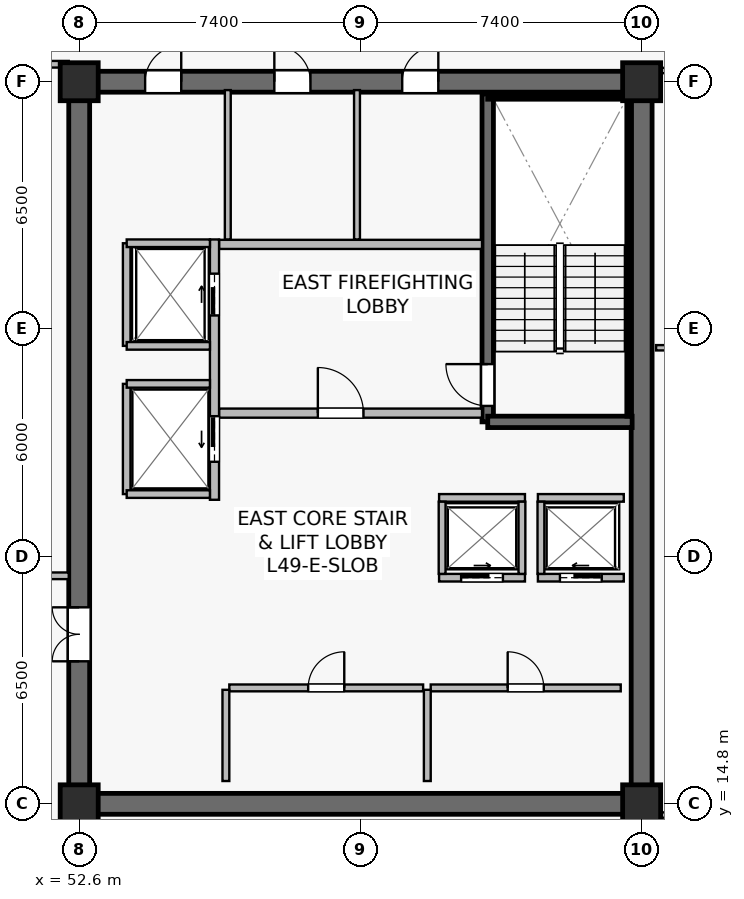
"""IFC4 building model, lengths in metres.
Left out: names, types, materials, properties, quantities, classifications, styles, units other than length and angle.
Written with IfcOpenShell. Run it as: python <this file> out.ifc"""

import sys

from ifc_helpers import new_model, si_unit, direction, frame, frame_2d, origin, origin_2d, place, context, subcontext, project, spatial, rectangle, extrude, source, transform, mapped, element, fill, save


model = new_model("IFC4")
c1 = context("Model", 3, precision=1e-05, world=origin(), true_north=direction((0.0, 1.0)))
c2 = subcontext(c1, "Body", "Model", "MODEL_VIEW")
j1 = project(units=[si_unit("LENGTHUNIT", "METRE"), si_unit("PLANEANGLEUNIT", "RADIAN")], contexts=[c1])
p1 = place(None, origin())
s1 = spatial("IfcSite", under=j1, at=p1, CompositionType="ELEMENT")
p2 = place(p1, origin())
s2 = spatial("IfcBuilding", under=s1, at=p2, CompositionType="ELEMENT")
p3 = place(p2, frame((0.0, 0.0, 205.5)))
s3 = spatial("IfcBuildingStorey", under=s2, at=p3, CompositionType="ELEMENT", Elevation=205.5)
p4 = place(p3, frame((52.325, 14.8, 0.0), z_axis=(0.0, 0.0, 1.0), x_axis=(1.0, 0.0, 0.0)))
e1 = element("IfcWall", 1, at=p4, inside=s3, PredefinedType="SHEAR", context=c2, shape_type="SweptSolid", body=[
    extrude(rectangle(XDim=15.35, YDim=0.55, at=frame_2d((7.675, 0.0))), origin(), (0.0, 0.0, 1.0), 3.8),
])
p5 = place(p3, frame((52.325, 33.8, 0.0), z_axis=(0.0, 0.0, 1.0), x_axis=(1.0, 0.0, 0.0)))
e2 = element("IfcWall", 2, at=p5, inside=s3, PredefinedType="SHEAR", context=c2, shape_type="SweptSolid", body=[
    extrude(rectangle(XDim=15.35, YDim=0.55, at=frame_2d((7.675, 0.0))), origin(), (0.0, 0.0, 1.0), 3.8),
])
p6 = place(p5, frame((8.775, 0.0, 0.0)))
e3 = element("IfcOpeningElement", 3, at=p6, cuts=e2, PredefinedType="OPENING", context=c2, shape_type="SweptSolid", body=[
    extrude(rectangle(XDim=0.95, YDim=2.15, at=frame_2d((0.475, 1.075))), frame((0.0, 0.285, 0.0), z_axis=(0.0, -1.0, 0.0), x_axis=(1.0, 0.0, 0.0)), (0.0, 0.0, 1.0), 0.57),
])
p7 = place(p5, frame((5.41, 0.0, 0.0)))
e4 = element("IfcOpeningElement", 4, at=p7, cuts=e2, PredefinedType="OPENING", context=c2, shape_type="SweptSolid", body=[
    extrude(rectangle(XDim=0.95, YDim=2.15, at=frame_2d((0.475, 1.075))), frame((0.0, 0.285, 0.0), z_axis=(0.0, -1.0, 0.0), x_axis=(1.0, 0.0, 0.0)), (0.0, 0.0, 1.0), 0.57),
])
p8 = place(p5, frame((2.01, 0.0, 0.0)))
e5 = element("IfcOpeningElement", 5, at=p8, cuts=e2, PredefinedType="OPENING", context=c2, shape_type="SweptSolid", body=[
    extrude(rectangle(XDim=0.95, YDim=2.15, at=frame_2d((0.475, 1.075))), frame((0.0, 0.285, 0.0), z_axis=(0.0, -1.0, 0.0), x_axis=(1.0, 0.0, 0.0)), (0.0, 0.0, 1.0), 0.57),
])
p9 = place(p3, frame((52.6, 15.075, 0.0), z_axis=(0.0, 0.0, 1.0), x_axis=(0.0, 1.0, 0.0)))
e6 = element("IfcWall", 6, at=p9, inside=s3, PredefinedType="SHEAR", context=c2, shape_type="SweptSolid", body=[
    extrude(rectangle(XDim=18.45, YDim=0.55, at=frame_2d((9.225, 0.0))), origin(), (0.0, 0.0, 1.0), 3.8),
])
p10 = place(p9, frame((3.475, 0.0, 0.0)))
e7 = element("IfcOpeningElement", 7, at=p10, cuts=e6, PredefinedType="OPENING", context=c2, shape_type="SweptSolid", body=[
    extrude(rectangle(XDim=1.42, YDim=2.2, at=frame_2d((0.71, 1.1))), frame((0.0, 0.285, 0.0), z_axis=(0.0, -1.0, 0.0), x_axis=(1.0, 0.0, 0.0)), (0.0, 0.0, 1.0), 0.57),
])
p11 = place(p3, frame((67.4, 15.075, 0.0), z_axis=(0.0, 0.0, 1.0), x_axis=(0.0, 1.0, 0.0)))
e8 = element("IfcWall", 8, at=p11, inside=s3, PredefinedType="SHEAR", context=c2, shape_type="SweptSolid", body=[
    extrude(rectangle(XDim=18.45, YDim=0.55, at=frame_2d((9.225, 0.0))), origin(), (0.0, 0.0, 1.0), 3.8),
])
p12 = place(p3, frame((63.35, 24.85, 0.0), z_axis=(0.0, 0.0, 1.0), x_axis=(0.0, 1.0, 0.0)))
e9 = element("IfcWall", 9, at=p12, inside=s3, PredefinedType="SHEAR", context=c2, shape_type="SweptSolid", body=[
    extrude(rectangle(XDim=8.63, YDim=0.3, at=frame_2d((4.315, 0.0))), origin(), (0.0, 0.0, 1.0), 3.8),
])
p13 = place(p12, frame((0.42, 0.0, 0.0)))
e10 = element("IfcOpeningElement", 10, at=p13, cuts=e9, PredefinedType="OPENING", context=c2, shape_type="SweptSolid", body=[
    extrude(rectangle(XDim=1.1, YDim=2.15, at=frame_2d((0.55, 1.075))), frame((0.0, 0.16, 0.0), z_axis=(0.0, -1.0, 0.0), x_axis=(1.0, 0.0, 0.0)), (0.0, 0.0, 1.0), 0.32),
])
p14 = place(p3, frame((63.35, 24.85, 0.0), z_axis=(0.0, 0.0, 1.0), x_axis=(1.0, 0.0, 0.0)))
e11 = element("IfcWall", 11, at=p14, inside=s3, PredefinedType="SHEAR", context=c2, shape_type="SweptSolid", body=[
    extrude(rectangle(XDim=3.8, YDim=0.3, at=frame_2d((1.9, 0.0))), origin(), (0.0, 0.0, 1.0), 3.8),
])
p15 = place(p3, frame((63.35, 33.4, 0.0), z_axis=(0.0, 0.0, 1.0), x_axis=(1.0, 0.0, 0.0)))
e12 = element("IfcWall", 12, at=p15, inside=s3, PredefinedType="SOLIDWALL", context=c2, shape_type="SweptSolid", body=[
    extrude(rectangle(XDim=3.72, YDim=0.12, at=frame_2d((1.86, 0.0))), origin(), (0.0, 0.0, 1.0), 3.8),
])
p16 = place(p3, frame((67.07, 25.0, 0.0), z_axis=(0.0, 0.0, 1.0), x_axis=(0.0, 1.0, 0.0)))
e13 = element("IfcWall", 13, at=p16, inside=s3, PredefinedType="SOLIDWALL", context=c2, shape_type="SweptSolid", body=[
    extrude(rectangle(XDim=8.32, YDim=0.12, at=frame_2d((4.16, 0.0))), origin(), (0.0, 0.0, 1.0), 3.8),
])
m1 = source(origin(), c2, "Body", "SweptSolid", [
    extrude(rectangle(XDim=1.0, YDim=1.0, at=origin_2d()), origin(), (0.0, 0.0, 1.0), 4.1),
])
for number, where, z_axis, x_axis in (
    (14, (52.6, 14.8, 0.0), (0.0, 0.0, 1.0), (1.0, 0.0, 0.0)),
    (15, (67.4, 14.8, 0.0), (0.0, 0.0, 1.0), (1.0, 0.0, 0.0)),
    (16, (52.6, 33.8, 0.0), (0.0, 0.0, 1.0), (1.0, 0.0, 0.0)),
    (17, (67.4, 33.8, 0.0), (0.0, 0.0, 1.0), (1.0, 0.0, 0.0)),
):
    element("IfcColumn", number, at=place(p3, frame(where, z_axis=z_axis, x_axis=x_axis)), inside=s3, PredefinedType="COLUMN", context=c2, shape_type="MappedRepresentation", body=[
        mapped(m1, transform((0.0, 0.0, 0.0), scale=1.0)),
    ])
p17 = place(p3, frame((56.28, 25.08, 0.0), z_axis=(0.0, 0.0, 1.0), x_axis=(1.0, 0.0, 0.0)))
e18 = element("IfcWall", 18, at=p17, inside=s3, PredefinedType="SOLIDWALL", context=c2, shape_type="SweptSolid", body=[
    extrude(rectangle(XDim=6.92, YDim=0.24, at=frame_2d((3.46, 0.0))), origin(), (0.0, 0.0, 1.0), 3.197),
])
p18 = place(p17, frame((2.6, 0.0, 0.0)))
e19 = element("IfcOpeningElement", 19, at=p18, cuts=e18, PredefinedType="OPENING", context=c2, shape_type="SweptSolid", body=[
    extrude(rectangle(XDim=1.2, YDim=2.16, at=frame_2d((0.6, 1.08))), frame((0.0, 0.13, 0.0), z_axis=(0.0, -1.0, 0.0), x_axis=(1.0, 0.0, 0.0)), (0.0, 0.0, 1.0), 0.26),
])
p19 = place(p3, frame((56.28, 29.52, 0.0), z_axis=(0.0, 0.0, 1.0), x_axis=(1.0, 0.0, 0.0)))
e20 = element("IfcWall", 20, at=p19, inside=s3, PredefinedType="SOLIDWALL", context=c2, shape_type="SweptSolid", body=[
    extrude(rectangle(XDim=6.92, YDim=0.24, at=frame_2d((3.46, 0.0))), origin(), (0.0, 0.0, 1.0), 3.197),
])
p20 = place(p3, frame((56.16, 22.8, 0.0), z_axis=(0.0, 0.0, 1.0), x_axis=(0.0, 1.0, 0.0)))
e21 = element("IfcWall", 21, at=p20, inside=s3, PredefinedType="SOLIDWALL", context=c2, shape_type="SweptSolid", body=[
    extrude(rectangle(XDim=6.85, YDim=0.24, at=frame_2d((3.425, 0.0))), origin(), (0.0, 0.0, 1.0), 2.935),
])
p21 = place(p20, frame((4.85, 0.0, 0.0)))
e22 = element("IfcOpeningElement", 22, at=p21, cuts=e21, PredefinedType="OPENING", context=c2, shape_type="SweptSolid", body=[
    extrude(rectangle(XDim=1.1, YDim=2.22, at=frame_2d((0.55, 1.11))), frame((0.0, 0.13, 0.0), z_axis=(0.0, -1.0, 0.0), x_axis=(1.0, 0.0, 0.0)), (0.0, 0.0, 1.0), 0.26),
])
p22 = place(p20, frame((1.0, 0.0, 0.0)))
e23 = element("IfcOpeningElement", 23, at=p22, cuts=e21, PredefinedType="OPENING", context=c2, shape_type="SweptSolid", body=[
    extrude(rectangle(XDim=1.2, YDim=2.22, at=frame_2d((0.6, 1.11))), frame((0.0, 0.13, 0.0), z_axis=(0.0, -1.0, 0.0), x_axis=(1.0, 0.0, 0.0)), (0.0, 0.0, 1.0), 0.26),
])
p23 = place(p3, frame((64.67, 20.75, 0.0), z_axis=(0.0, 0.0, 1.0), x_axis=(1.0, 0.0, 0.0)))
e24 = element("IfcWall", 24, at=p23, inside=s3, PredefinedType="SOLIDWALL", context=c2, shape_type="SweptSolid", body=[
    extrude(rectangle(XDim=2.26, YDim=0.2, at=frame_2d((1.13, 0.0))), origin(), (0.0, 0.0, 1.0), 3.8),
])
p24 = place(p23, frame((0.58, 0.0, 0.0)))
e25 = element("IfcOpeningElement", 25, at=p24, cuts=e24, PredefinedType="OPENING", context=c2, shape_type="SweptSolid", body=[
    extrude(rectangle(XDim=1.1, YDim=2.22, at=frame_2d((0.55, 1.11))), frame((0.0, 0.11, 0.0), z_axis=(0.0, -1.0, 0.0), x_axis=(1.0, 0.0, 0.0)), (0.0, 0.0, 1.0), 0.22),
])
p25 = place(p3, frame((64.67, 22.85, 0.0), z_axis=(0.0, 0.0, 1.0), x_axis=(1.0, 0.0, 0.0)))
e26 = element("IfcWall", 26, at=p25, inside=s3, PredefinedType="SOLIDWALL", context=c2, shape_type="SweptSolid", body=[
    extrude(rectangle(XDim=2.26, YDim=0.2, at=frame_2d((1.13, 0.0))), origin(), (0.0, 0.0, 1.0), 3.8),
])
p26 = place(p3, frame((64.75, 20.85, 0.0), z_axis=(0.0, 0.0, 1.0), x_axis=(0.0, 1.0, 0.0)))
e27 = element("IfcWall", 27, at=p26, inside=s3, PredefinedType="SOLIDWALL", context=c2, shape_type="SweptSolid", body=[
    extrude(rectangle(XDim=1.9, YDim=0.18, at=frame_2d((0.95, 0.0))), origin(), (0.0, 0.0, 1.0), 3.8),
])
p27 = place(p3, frame((62.07, 20.75, 0.0), z_axis=(0.0, 0.0, 1.0), x_axis=(1.0, 0.0, 0.0)))
e28 = element("IfcWall", 28, at=p27, inside=s3, PredefinedType="SOLIDWALL", context=c2, shape_type="SweptSolid", body=[
    extrude(rectangle(XDim=2.26, YDim=0.2, at=frame_2d((1.13, 0.0))), origin(), (0.0, 0.0, 1.0), 3.8),
])
p28 = place(p27, frame((0.58, 0.0, 0.0)))
e29 = element("IfcOpeningElement", 29, at=p28, cuts=e28, PredefinedType="OPENING", context=c2, shape_type="SweptSolid", body=[
    extrude(rectangle(XDim=1.1, YDim=2.22, at=frame_2d((0.55, 1.11))), frame((0.0, 0.11, 0.0), z_axis=(0.0, -1.0, 0.0), x_axis=(1.0, 0.0, 0.0)), (0.0, 0.0, 1.0), 0.22),
])
p29 = place(p3, frame((62.07, 22.85, 0.0), z_axis=(0.0, 0.0, 1.0), x_axis=(1.0, 0.0, 0.0)))
e30 = element("IfcWall", 30, at=p29, inside=s3, PredefinedType="SOLIDWALL", context=c2, shape_type="SweptSolid", body=[
    extrude(rectangle(XDim=2.26, YDim=0.2, at=frame_2d((1.13, 0.0))), origin(), (0.0, 0.0, 1.0), 3.8),
])
for number, where, z_axis, x_axis in (
    (31, (62.15, 20.85, 0.0), (0.0, 0.0, 1.0), (0.0, 1.0, 0.0)),
    (32, (64.25, 20.85, 0.0), (0.0, 0.0, 1.0), (0.0, 1.0, 0.0)),
):
    element("IfcWall", number, at=place(p3, frame(where, z_axis=z_axis, x_axis=x_axis)), inside=s3, PredefinedType="SOLIDWALL", context=c2, shape_type="SweptSolid", body=[
        extrude(rectangle(XDim=1.9, YDim=0.18, at=frame_2d((0.95, 0.0))), origin(), (0.0, 0.0, 1.0), 3.8),
    ])
p30 = place(p3, frame((53.85, 26.85, 0.0), z_axis=(0.0, 0.0, 1.0), x_axis=(0.0, 1.0, 0.0)))
e33 = element("IfcWall", 33, at=p30, inside=s3, PredefinedType="SOLIDWALL", context=c2, shape_type="SweptSolid", body=[
    extrude(rectangle(XDim=2.7, YDim=0.2, at=frame_2d((1.35, 0.0))), origin(), (0.0, 0.0, 1.0), 3.8),
])
p31 = place(p3, frame((53.85, 29.55, 0.0), z_axis=(0.0, 0.0, 1.0), x_axis=(1.0, 0.0, 0.0)))
e34 = element("IfcWall", 34, at=p31, inside=s3, PredefinedType="SOLIDWALL", context=c2, shape_type="SweptSolid", body=[
    extrude(rectangle(XDim=2.19, YDim=0.2, at=frame_2d((1.095, 0.0))), origin(), (0.0, 0.0, 1.0), 3.8),
])
p32 = place(p3, frame((53.85, 26.85, 0.0), z_axis=(0.0, 0.0, 1.0), x_axis=(1.0, 0.0, 0.0)))
e35 = element("IfcWall", 35, at=p32, inside=s3, PredefinedType="SOLIDWALL", context=c2, shape_type="SweptSolid", body=[
    extrude(rectangle(XDim=2.19, YDim=0.2, at=frame_2d((1.095, 0.0))), origin(), (0.0, 0.0, 1.0), 3.197),
])
p33 = place(p3, frame((53.85, 22.95, 0.0), z_axis=(0.0, 0.0, 1.0), x_axis=(0.0, 1.0, 0.0)))
e36 = element("IfcWall", 36, at=p33, inside=s3, PredefinedType="SOLIDWALL", context=c2, shape_type="SweptSolid", body=[
    extrude(rectangle(XDim=2.9, YDim=0.2, at=frame_2d((1.45, 0.0))), origin(), (0.0, 0.0, 1.0), 2.935),
])
for number, where, z_axis, x_axis in (
    (37, (53.85, 25.85, 0.0), (0.0, 0.0, 1.0), (1.0, 0.0, 0.0)),
    (38, (53.85, 22.95, 0.0), (0.0, 0.0, 1.0), (1.0, 0.0, 0.0)),
):
    element("IfcWall", number, at=place(p3, frame(where, z_axis=z_axis, x_axis=x_axis)), inside=s3, PredefinedType="SOLIDWALL", context=c2, shape_type="SweptSolid", body=[
        extrude(rectangle(XDim=2.19, YDim=0.2, at=frame_2d((1.095, 0.0))), origin(), (0.0, 0.0, 1.0), 3.8),
    ])
p34 = place(p3, frame((61.85, 17.85, 0.0), z_axis=(0.0, 0.0, 1.0), x_axis=(1.0, 0.0, 0.0)))
e39 = element("IfcWall", 39, at=p34, inside=s3, PredefinedType="SOLIDWALL", context=c2, shape_type="SweptSolid", body=[
    extrude(rectangle(XDim=5.0, YDim=0.18, at=frame_2d((2.5, 0.0))), origin(), (0.0, 0.0, 1.0), 3.8),
])
p35 = place(p34, frame((2.025, 0.0, 0.0)))
e40 = element("IfcOpeningElement", 40, at=p35, cuts=e39, PredefinedType="OPENING", context=c2, shape_type="SweptSolid", body=[
    extrude(rectangle(XDim=0.95, YDim=2.15, at=frame_2d((0.475, 1.075))), frame((0.0, 0.1, 0.0), z_axis=(0.0, -1.0, 0.0), x_axis=(1.0, 0.0, 0.0)), (0.0, 0.0, 1.0), 0.2),
])
p36 = place(p3, frame((61.76, 15.4, 0.0), z_axis=(0.0, 0.0, 1.0), x_axis=(0.0, 1.0, 0.0)))
e41 = element("IfcWall", 41, at=p36, inside=s3, PredefinedType="SOLIDWALL", context=c2, shape_type="SweptSolid", body=[
    extrude(rectangle(XDim=2.4, YDim=0.18, at=frame_2d((1.2, 0.0))), origin(), (0.0, 0.0, 1.0), 3.8),
])
p37 = place(p3, frame((56.55, 17.85, 0.0), z_axis=(0.0, 0.0, 1.0), x_axis=(1.0, 0.0, 0.0)))
e42 = element("IfcWall", 42, at=p37, inside=s3, PredefinedType="SOLIDWALL", context=c2, shape_type="SweptSolid", body=[
    extrude(rectangle(XDim=5.1, YDim=0.18, at=frame_2d((2.55, 0.0))), origin(), (0.0, 0.0, 1.0), 3.197),
])
p38 = place(p37, frame((2.075, 0.0, 0.0)))
e43 = element("IfcOpeningElement", 43, at=p38, cuts=e42, PredefinedType="OPENING", context=c2, shape_type="SweptSolid", body=[
    extrude(rectangle(XDim=0.95, YDim=2.15, at=frame_2d((0.475, 1.075))), frame((0.0, 0.1, 0.0), z_axis=(0.0, -1.0, 0.0), x_axis=(1.0, 0.0, 0.0)), (0.0, 0.0, 1.0), 0.2),
])
p39 = place(p3, frame((56.46, 15.4, 0.0), z_axis=(0.0, 0.0, 1.0), x_axis=(0.0, 1.0, 0.0)))
e44 = element("IfcWall", 44, at=p39, inside=s3, PredefinedType="SOLIDWALL", context=c2, shape_type="SweptSolid", body=[
    extrude(rectangle(XDim=2.4, YDim=0.18, at=frame_2d((1.2, 0.0))), origin(), (0.0, 0.0, 1.0), 3.8),
])
p40 = place(p3, frame((59.91, 29.65, 0.0), z_axis=(0.0, 0.0, 1.0), x_axis=(0.0, 1.0, 0.0)))
e45 = element("IfcWall", 45, at=p40, inside=s3, PredefinedType="PLUMBINGWALL", context=c2, shape_type="SweptSolid", body=[
    extrude(rectangle(XDim=3.93, YDim=0.155, at=frame_2d((1.965, 0.0))), origin(), (0.0, 0.0, 1.0), 3.197),
])
p41 = place(p3, frame((56.51, 29.65, 0.0), z_axis=(0.0, 0.0, 1.0), x_axis=(0.0, 1.0, 0.0)))
e46 = element("IfcWall", 46, at=p41, inside=s3, PredefinedType="PLUMBINGWALL", context=c2, shape_type="SweptSolid", body=[
    extrude(rectangle(XDim=3.93, YDim=0.155, at=frame_2d((1.965, 0.0))), origin(), (0.0, 0.0, 1.0), 3.8),
])
p42 = place(p3, frame((48.3, 34.26, 0.0), z_axis=(0.0, 0.0, 1.0), x_axis=(1.0, 0.0, 0.0)))
e47 = element("IfcWall", 47, at=p42, inside=s3, PredefinedType="PARTITIONING", context=c2, shape_type="SweptSolid", body=[
    extrude(rectangle(XDim=4.025, YDim=0.175, at=frame_2d((2.012, 0.0))), origin(), (0.0, 0.0, 1.0), 3.485),
])
p43 = place(p3, frame((48.3, 20.8, 0.0), z_axis=(0.0, 0.0, 1.0), x_axis=(1.0, 0.0, 0.0)))
e48 = element("IfcWall", 48, at=p43, inside=s3, PredefinedType="PARTITIONING", context=c2, shape_type="SweptSolid", body=[
    extrude(rectangle(XDim=4.025, YDim=0.175, at=frame_2d((2.012, 0.0))), origin(), (0.0, 0.0, 1.0), 3.8),
])
p44 = place(p43, frame((1.35, 0.0, 0.0)))
e49 = element("IfcOpeningElement", 49, at=p44, cuts=e48, PredefinedType="OPENING", context=c2, shape_type="SweptSolid", body=[
    extrude(rectangle(XDim=0.95, YDim=2.15, at=frame_2d((0.475, 1.075))), frame((0.0, 0.098, 0.0), z_axis=(0.0, -1.0, 0.0), x_axis=(1.0, 0.0, 0.0)), (0.0, 0.0, 1.0), 0.195),
])
p45 = place(p3, frame((67.78, 26.8, 0.0), z_axis=(0.0, 0.0, 1.0), x_axis=(1.0, 0.0, 0.0)))
e50 = element("IfcWall", 50, at=p45, inside=s3, PredefinedType="PARTITIONING", context=c2, shape_type="SweptSolid", body=[
    extrude(rectangle(XDim=2.91, YDim=0.14, at=frame_2d((1.455, 0.0))), origin(), (0.0, 0.0, 1.0), 3.8),
])
p46 = place(p3, frame((67.78, 14.505, 0.0), z_axis=(0.0, 0.0, 1.0), x_axis=(1.0, 0.0, 0.0)))
e51 = element("IfcWall", 51, at=p46, inside=s3, PredefinedType="PARTITIONING", context=c2, shape_type="SweptSolid", body=[
    extrude(rectangle(XDim=2.91, YDim=0.14, at=frame_2d((1.455, 0.0))), origin(), (0.0, 0.0, 1.0), 3.8),
])
p47 = place(p46, frame((1.005, 0.0, 0.0)))
e52 = element("IfcOpeningElement", 52, at=p47, cuts=e51, PredefinedType="OPENING", context=c2, shape_type="SweptSolid", body=[
    extrude(rectangle(XDim=0.9, YDim=2.1, at=frame_2d((0.45, 1.05))), frame((0.0, 0.08, 0.0), z_axis=(0.0, -1.0, 0.0), x_axis=(1.0, 0.0, 0.0)), (0.0, 0.0, 1.0), 0.16),
])
p48 = place(p3, frame((67.78, 34.095, 0.0), z_axis=(0.0, 0.0, 1.0), x_axis=(1.0, 0.0, 0.0)))
e53 = element("IfcWall", 53, at=p48, inside=s3, PredefinedType="PARTITIONING", context=c2, shape_type="SweptSolid", body=[
    extrude(rectangle(XDim=2.91, YDim=0.14, at=frame_2d((1.455, 0.0))), origin(), (0.0, 0.0, 1.0), 3.8),
])
p49 = place(p48, frame((1.005, 0.0, 0.0)))
e54 = element("IfcOpeningElement", 54, at=p49, cuts=e53, PredefinedType="OPENING", context=c2, shape_type="SweptSolid", body=[
    extrude(rectangle(XDim=0.9, YDim=2.1, at=frame_2d((0.45, 1.05))), frame((0.0, 0.08, 0.0), z_axis=(0.0, -1.0, 0.0), x_axis=(1.0, 0.0, 0.0)), (0.0, 0.0, 1.0), 0.16),
])
m2 = source(origin(), c2, "Body", "SweptSolid", [
    extrude(rectangle(XDim=1.1, YDim=2.15, at=frame_2d((0.55, 1.075))), frame((0.0, 0.025, 0.0), z_axis=(0.0, -1.0, 0.0), x_axis=(1.0, 0.0, 0.0)), (0.0, 0.0, 1.0), 0.05),
])
p50 = place(p13, origin())
e55 = element("IfcDoor", 55, at=p50, inside=s3, OperationType="SINGLE_SWING_RIGHT", PredefinedType="DOOR", context=c2, shape_type="MappedRepresentation", body=[
    mapped(m2, transform((0.0, 0.0, 0.0), scale=1.0)),
])
fill(e10, e55)
m3 = source(origin(), c2, "Body", "SweptSolid", [
    extrude(rectangle(XDim=1.2, YDim=2.16, at=frame_2d((0.6, 1.08))), frame((0.0, 0.025, 0.0), z_axis=(0.0, -1.0, 0.0), x_axis=(1.0, 0.0, 0.0)), (0.0, 0.0, 1.0), 0.05),
])
p51 = place(p18, origin())
e56 = element("IfcDoor", 56, at=p51, inside=s3, OperationType="SINGLE_SWING_LEFT", PredefinedType="DOOR", context=c2, shape_type="MappedRepresentation", body=[
    mapped(m3, transform((0.0, 0.0, 0.0), scale=1.0)),
])
fill(e19, e56)
m4 = source(origin(), c2, "Body", "SweptSolid", [
    extrude(rectangle(XDim=1.1, YDim=2.22, at=frame_2d((0.55, 1.11))), frame((0.0, 0.025, 0.0), z_axis=(0.0, -1.0, 0.0), x_axis=(1.0, 0.0, 0.0)), (0.0, 0.0, 1.0), 0.05),
])
p52 = place(p24, origin())
e57 = element("IfcDoor", 57, at=p52, inside=s3, OperationType="SLIDING_TO_LEFT", PredefinedType="USERDEFINED", context=c2, shape_type="MappedRepresentation", body=[
    mapped(m4, transform((0.0, 0.0, 0.0), scale=1.0)),
])
fill(e25, e57)
p53 = place(p28, origin())
e58 = element("IfcDoor", 58, at=p53, inside=s3, OperationType="SLIDING_TO_RIGHT", PredefinedType="USERDEFINED", context=c2, shape_type="MappedRepresentation", body=[
    mapped(m4, transform((0.0, 0.0, 0.0), scale=1.0)),
])
fill(e29, e58)
p54 = place(p21, origin())
e59 = element("IfcDoor", 59, at=p54, inside=s3, OperationType="SLIDING_TO_RIGHT", PredefinedType="USERDEFINED", context=c2, shape_type="MappedRepresentation", body=[
    mapped(m4, transform((0.0, 0.0, 0.0), scale=1.0)),
])
fill(e22, e59)
m5 = source(origin(), c2, "Body", "SweptSolid", [
    extrude(rectangle(XDim=1.2, YDim=2.22, at=frame_2d((0.6, 1.11))), frame((0.0, 0.025, 0.0), z_axis=(0.0, -1.0, 0.0), x_axis=(1.0, 0.0, 0.0)), (0.0, 0.0, 1.0), 0.05),
])
p55 = place(p22, origin())
e60 = element("IfcDoor", 60, at=p55, inside=s3, OperationType="SLIDING_TO_LEFT", PredefinedType="USERDEFINED", context=c2, shape_type="MappedRepresentation", body=[
    mapped(m5, transform((0.0, 0.0, 0.0), scale=1.0)),
])
fill(e23, e60)
m6 = source(origin(), c2, "Body", "SweptSolid", [
    extrude(rectangle(XDim=0.95, YDim=2.15, at=frame_2d((0.475, 1.075))), frame((0.0, 0.025, 0.0), z_axis=(0.0, -1.0, 0.0), x_axis=(1.0, 0.0, 0.0)), (0.0, 0.0, 1.0), 0.05),
])
p56 = place(p35, origin())
e61 = element("IfcDoor", 61, at=p56, inside=s3, OperationType="SINGLE_SWING_LEFT", PredefinedType="DOOR", context=c2, shape_type="MappedRepresentation", body=[
    mapped(m6, transform((0.0, 0.0, 0.0), scale=1.0)),
])
fill(e40, e61)
p57 = place(p38, origin())
e62 = element("IfcDoor", 62, at=p57, inside=s3, OperationType="SINGLE_SWING_RIGHT", PredefinedType="DOOR", context=c2, shape_type="MappedRepresentation", body=[
    mapped(m6, transform((0.0, 0.0, 0.0), scale=1.0)),
])
fill(e43, e62)
m7 = source(origin(), c2, "Body", "SweptSolid", [
    extrude(rectangle(XDim=1.42, YDim=2.2, at=frame_2d((0.71, 1.1))), frame((0.0, 0.025, 0.0), z_axis=(0.0, -1.0, 0.0), x_axis=(1.0, 0.0, 0.0)), (0.0, 0.0, 1.0), 0.05),
])
p58 = place(p10, origin())
e63 = element("IfcDoor", 63, at=p58, inside=s3, OperationType="DOUBLE_DOOR_SINGLE_SWING", PredefinedType="DOOR", context=c2, shape_type="MappedRepresentation", body=[
    mapped(m7, transform((0.0, 0.0, 0.0), scale=1.0)),
])
fill(e7, e63)
p59 = place(p6, origin())
e64 = element("IfcDoor", 64, at=p59, inside=s3, OperationType="SINGLE_SWING_RIGHT", PredefinedType="DOOR", context=c2, shape_type="MappedRepresentation", body=[
    mapped(m6, transform((0.0, 0.0, 0.0), scale=1.0)),
])
fill(e3, e64)
p60 = place(p7, origin())
e65 = element("IfcDoor", 65, at=p60, inside=s3, OperationType="SINGLE_SWING_LEFT", PredefinedType="DOOR", context=c2, shape_type="MappedRepresentation", body=[
    mapped(m6, transform((0.0, 0.0, 0.0), scale=1.0)),
])
fill(e4, e65)
p61 = place(p8, origin())
e66 = element("IfcDoor", 66, at=p61, inside=s3, OperationType="SINGLE_SWING_RIGHT", PredefinedType="DOOR", context=c2, shape_type="MappedRepresentation", body=[
    mapped(m6, transform((0.0, 0.0, 0.0), scale=1.0)),
])
fill(e5, e66)
save(model, sys.argv[1])
